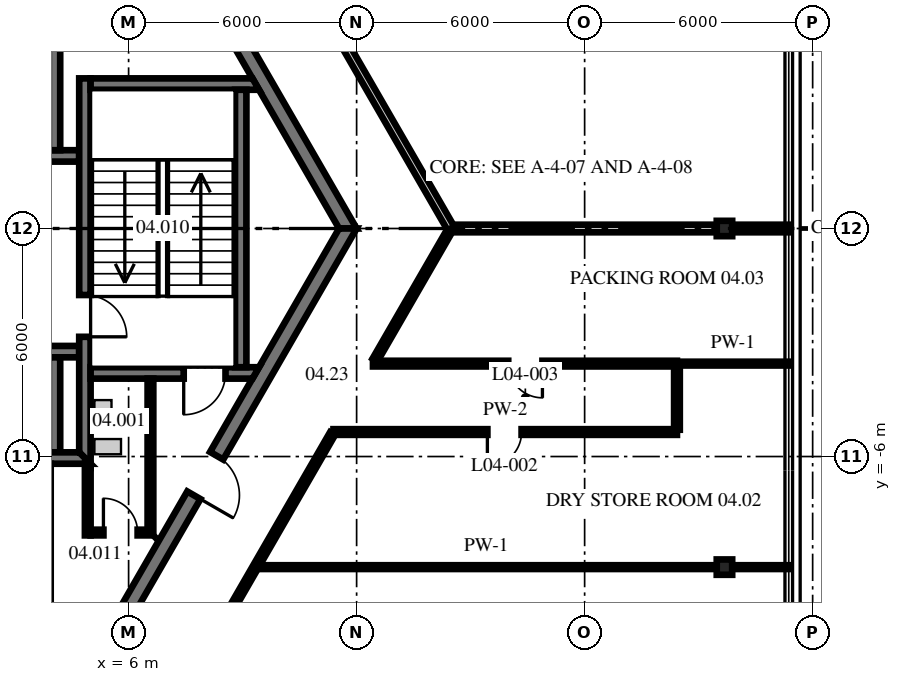
"""IFC4 building model, lengths in metres.
Left out: names, types, materials, properties, quantities, classifications, styles, units other than length and angle.
Written with IfcOpenShell. Run it as: python <this file> out.ifc"""

import sys

from ifc_helpers import new_model, si_unit, direction, frame, frame_2d, origin, origin_2d, place, context, subcontext, project, spatial, polyline, rectangle, i_section, outline, extrude, source, transform, mapped, element, fill, save


model = new_model("IFC4")
c1 = context("Model", 3, precision=1e-05, world=origin(), true_north=direction((0.0, 1.0)))
c2 = subcontext(c1, "Body", "Model", "MODEL_VIEW")
j1 = project(units=[si_unit("LENGTHUNIT", "METRE"), si_unit("PLANEANGLEUNIT", "RADIAN")], contexts=[c1])
p1 = place(None, origin())
s1 = spatial("IfcSite", under=j1, at=p1, CompositionType="ELEMENT")
p2 = place(p1, origin())
s2 = spatial("IfcBuilding", under=s1, at=p2, CompositionType="ELEMENT")
p3 = place(p2, frame((0.0, 0.0, 20.3)))
s3 = spatial("IfcBuildingStorey", under=s2, at=p3, CompositionType="ELEMENT", Elevation=20.3)
m1 = source(origin(), c2, "Body", "SweptSolid", [
    extrude(i_section(OverallWidth=0.404, OverallDepth=0.406, WebThickness=0.027, FlangeThickness=0.044, at=origin_2d()), origin(), (0.0, 0.0, 1.0), 4.3),
])
for number, where, z_axis, x_axis in (
    (1, (21.679, -8.91, 0.0), (0.0, 0.0, 1.0), (0.0, 1.0, 0.0)),
    (2, (21.679, 0.0, 0.0), (0.0, 0.0, 1.0), (0.0, 1.0, 0.0)),
):
    element("IfcColumn", number, at=place(p3, frame(where, z_axis=z_axis, x_axis=x_axis)), inside=s3, PredefinedType="COLUMN", context=c2, shape_type="MappedRepresentation", body=[
        mapped(m1, transform((0.0, 0.0, 0.0), scale=1.0)),
    ])
m2 = source(origin(), c2, "Body", "SweptSolid", [
    extrude(outline(polyline([(-0.115, -0.2), (11.885, -0.2), (11.654, 0.2), (0.115, 0.2), (-0.115, -0.2)])), origin(), (0.0, 0.0, 1.0), 4.1),
])
p4 = place(p3, frame((11.769, 0.0, 0.0), z_axis=(0.0, 0.0, 1.0), x_axis=(-0.499996592174, 0.866027371285, 0.0)))
e3 = element("IfcWall", 3, at=p4, inside=s3, PredefinedType="SHEAR", context=c2, shape_type="MappedRepresentation", body=[
    mapped(m2, transform((0.0, 0.0, 0.0), scale=1.0)),
])
p5 = place(p4, frame((5.75, 0.0, 0.0)))
e4 = element("IfcOpeningElement", 4, at=p5, cuts=e3, PredefinedType="OPENING", context=c2, shape_type="SweptSolid", body=[
    extrude(rectangle(XDim=1.2, YDim=2.1, at=frame_2d((0.6, 1.05))), frame((0.0, 0.21, 0.0), z_axis=(0.0, -1.0, 0.0), x_axis=(1.0, 0.0, 0.0)), (0.0, 0.0, 1.0), 0.42),
])
p6 = place(p3, frame((5.885, -10.192, 0.0), z_axis=(0.0, 0.0, 1.0), x_axis=(0.499996592174, 0.866027371285, 0.0)))
e5 = element("IfcWall", 5, at=p6, inside=s3, PredefinedType="SHEAR", context=c2, shape_type="MappedRepresentation", body=[
    mapped(m2, transform((0.0, 0.0, 0.0), scale=1.0)),
])
p7 = place(p6, frame((3.665, 0.0, 0.0)))
e6 = element("IfcOpeningElement", 6, at=p7, cuts=e5, PredefinedType="OPENING", context=c2, shape_type="SweptSolid", body=[
    extrude(rectangle(XDim=1.2, YDim=2.1, at=frame_2d((0.6, 1.05))), frame((0.0, 0.21, 0.0), z_axis=(0.0, -1.0, 0.0), x_axis=(1.0, 0.0, 0.0)), (0.0, 0.0, 1.0), 0.42),
])
m3 = source(origin(), c2, "Body", "SweptSolid", [
    extrude(rectangle(XDim=3.0, YDim=0.3, at=frame_2d((1.5, 0.0))), origin(), (0.0, 0.0, 1.0), 4.1),
])
p8 = place(p3, frame((1.7, 1.91, 0.0), z_axis=(0.0, 0.0, 1.0), x_axis=(1.0, 0.0, 0.0)))
e7 = element("IfcWall", 7, at=p8, inside=s3, PredefinedType="SHEAR", context=c2, shape_type="MappedRepresentation", body=[
    mapped(m3, transform((0.0, 0.0, 0.0), scale=1.0)),
])
p9 = place(p8, frame((0.55, 0.0, 0.0)))
e8 = element("IfcOpeningElement", 8, at=p9, cuts=e7, PredefinedType="OPENING", context=c2, shape_type="SweptSolid", body=[
    extrude(rectangle(XDim=1.1, YDim=2.1, at=frame_2d((0.55, 1.05))), frame((0.0, 0.16, 0.0), z_axis=(0.0, -1.0, 0.0), x_axis=(1.0, 0.0, 0.0)), (0.0, 0.0, 1.0), 0.32),
])
m4 = source(origin(), c2, "Body", "SweptSolid", [
    extrude(rectangle(XDim=2.9, YDim=0.3, at=frame_2d((1.45, 0.0))), origin(), (0.0, 0.0, 1.0), 4.1),
])
p10 = place(p3, frame((4.05, 2.06, 0.0), z_axis=(0.0, 0.0, 1.0), x_axis=(0.0, 1.0, 0.0)))
e9 = element("IfcWall", 9, at=p10, inside=s3, PredefinedType="SHEAR", context=c2, shape_type="MappedRepresentation", body=[
    mapped(m4, transform((0.0, 0.0, 0.0), scale=1.0)),
])
m5 = source(origin(), c2, "Body", "SweptSolid", [
    extrude(rectangle(XDim=12.8, YDim=0.3, at=frame_2d((6.4, 0.0))), origin(), (0.0, 0.0, 1.0), 4.1),
])
p11 = place(p3, frame((-8.1, -3.24, 0.0), z_axis=(0.0, 0.0, 1.0), x_axis=(1.0, 0.0, 0.0)))
e10 = element("IfcWall", 10, at=p11, inside=s3, PredefinedType="SHEAR", context=c2, shape_type="MappedRepresentation", body=[
    mapped(m5, transform((0.0, 0.0, 0.0), scale=1.0)),
])
p12 = place(p11, frame((2.212, 0.0, 0.0)))
e11 = element("IfcOpeningElement", 11, at=p12, cuts=e10, PredefinedType="OPENING", context=c2, shape_type="SweptSolid", body=[
    extrude(rectangle(XDim=0.9, YDim=2.1, at=frame_2d((0.45, 1.05))), frame((0.0, 0.16, 0.0), z_axis=(0.0, -1.0, 0.0), x_axis=(1.0, 0.0, 0.0)), (0.0, 0.0, 1.0), 0.32),
])
p13 = place(p11, frame((5.65, 0.0, 0.0)))
e12 = element("IfcOpeningElement", 12, at=p13, cuts=e10, PredefinedType="OPENING", context=c2, shape_type="SweptSolid", body=[
    extrude(rectangle(XDim=0.9, YDim=2.1, at=frame_2d((0.45, 1.05))), frame((0.0, 0.16, 0.0), z_axis=(0.0, -1.0, 0.0), x_axis=(1.0, 0.0, 0.0)), (0.0, 0.0, 1.0), 0.32),
])
p14 = place(p11, frame((7.887, 0.0, 0.0)))
e13 = element("IfcOpeningElement", 13, at=p14, cuts=e10, PredefinedType="OPENING", context=c2, shape_type="SweptSolid", body=[
    extrude(rectangle(XDim=0.9, YDim=2.1, at=frame_2d((0.45, 1.05))), frame((0.0, 0.16, 0.0), z_axis=(0.0, -1.0, 0.0), x_axis=(1.0, 0.0, 0.0)), (0.0, 0.0, 1.0), 0.32),
])
p15 = place(p11, frame((10.35, 0.0, 0.0)))
e14 = element("IfcOpeningElement", 14, at=p15, cuts=e10, PredefinedType="OPENING", context=c2, shape_type="SweptSolid", body=[
    extrude(rectangle(XDim=1.1, YDim=2.1, at=frame_2d((0.55, 1.05))), frame((0.0, 0.16, 0.0), z_axis=(0.0, -1.0, 0.0), x_axis=(1.0, 0.0, 0.0)), (0.0, 0.0, 1.0), 0.32),
])
m6 = source(origin(), c2, "Body", "SweptSolid", [
    extrude(rectangle(XDim=2.5, YDim=0.3, at=frame_2d((1.25, 0.0))), origin(), (0.0, 0.0, 1.0), 4.1),
])
p16 = place(p3, frame((4.05, -5.89, 0.0), z_axis=(0.0, 0.0, 1.0), x_axis=(0.0, 1.0, 0.0)))
e15 = element("IfcWall", 15, at=p16, inside=s3, PredefinedType="SHEAR", context=c2, shape_type="MappedRepresentation", body=[
    mapped(m6, transform((0.0, 0.0, 0.0), scale=1.0)),
])
m7 = source(origin(), c2, "Body", "SweptSolid", [
    extrude(outline(polyline([(-0.15, -0.15), (9.99, -0.15), (9.99, 0.15), (0.15, 0.15), (-0.15, -0.15)])), origin(), (0.0, 0.0, 1.0), 4.1),
])
p17 = place(p3, frame((4.85, -6.04, 0.0), z_axis=(0.0, 0.0, 1.0), x_axis=(0.0, 1.0, 0.0)))
e16 = element("IfcWall", 16, at=p17, inside=s3, PredefinedType="SHEAR", context=c2, shape_type="MappedRepresentation", body=[
    mapped(m7, transform((0.0, 0.0, 0.0), scale=1.0)),
])
p18 = place(p17, frame((3.19, 0.0, 0.0)))
e17 = element("IfcOpeningElement", 17, at=p18, cuts=e16, PredefinedType="OPENING", context=c2, shape_type="SweptSolid", body=[
    extrude(rectangle(XDim=1.1, YDim=2.1, at=frame_2d((0.55, 1.05))), frame((0.0, 0.16, 0.0), z_axis=(0.0, -1.0, 0.0), x_axis=(1.0, 0.0, 0.0)), (0.0, 0.0, 1.0), 0.32),
])
m8 = source(origin(), c2, "Body", "SweptSolid", [
    extrude(outline(polyline([(0.0, -0.15), (0.0, 0.15), (4.26, 0.15), (4.433, -0.15), (0.0, -0.15)])), origin(), (0.0, 0.0, 1.0), 4.1),
])
p19 = place(p3, frame((5.0, 3.8, 0.0), z_axis=(0.0, 0.0, 1.0), x_axis=(1.0, 0.0, 0.0)))
e18 = element("IfcWall", 18, at=p19, inside=s3, PredefinedType="SHEAR", context=c2, shape_type="MappedRepresentation", body=[
    mapped(m8, transform((0.0, 0.0, 0.0), scale=1.0)),
])
m9 = source(origin(), c2, "Body", "SweptSolid", [
    extrude(outline(polyline([(0.0, -0.15), (0.0, 0.15), (4.433, 0.15), (4.26, -0.15), (0.0, -0.15)])), origin(), (0.0, 0.0, 1.0), 4.1),
])
p20 = place(p3, frame((5.0, -3.8, 0.0), z_axis=(0.0, 0.0, 1.0), x_axis=(1.0, 0.0, 0.0)))
e19 = element("IfcWall", 19, at=p20, inside=s3, PredefinedType="SHEAR", context=c2, shape_type="MappedRepresentation", body=[
    mapped(m9, transform((0.0, 0.0, 0.0), scale=1.0)),
])
p21 = place(p20, frame((2.45, 0.0, 0.0)))
e20 = element("IfcOpeningElement", 20, at=p21, cuts=e19, PredefinedType="OPENING", context=c2, shape_type="SweptSolid", body=[
    extrude(rectangle(XDim=1.1, YDim=2.1, at=frame_2d((0.55, 1.05))), frame((0.0, 0.16, 0.0), z_axis=(0.0, -1.0, 0.0), x_axis=(1.0, 0.0, 0.0)), (0.0, 0.0, 1.0), 0.32),
])
m10 = source(origin(), c2, "Body", "SweptSolid", [
    extrude(rectangle(XDim=7.3, YDim=0.3, at=frame_2d((3.65, 0.0))), origin(), (0.0, 0.0, 1.0), 4.1),
])
p22 = place(p3, frame((8.95, -3.65, 0.0), z_axis=(0.0, 0.0, 1.0), x_axis=(0.0, 1.0, 0.0)))
e21 = element("IfcWall", 21, at=p22, inside=s3, PredefinedType="SHEAR", context=c2, shape_type="MappedRepresentation", body=[
    mapped(m10, transform((0.0, 0.0, 0.0), scale=1.0)),
])
m11 = source(origin(), c2, "Body", "SweptSolid", [
    extrude(outline(polyline([(0.0, -0.15), (8.95, -0.15), (8.65, 0.15), (0.0, 0.15), (0.0, -0.15)])), origin(), (0.0, 0.0, 1.0), 4.1),
])
p23 = place(p3, frame((-3.95, -6.04, 0.0), z_axis=(0.0, 0.0, 1.0), x_axis=(1.0, 0.0, 0.0)))
e22 = element("IfcWall", 22, at=p23, inside=s3, PredefinedType="SHEAR", context=c2, shape_type="MappedRepresentation", body=[
    mapped(m11, transform((0.0, 0.0, 0.0), scale=1.0)),
])
m12 = source(origin(), c2, "Body", "SweptSolid", [
    extrude(outline(polyline([(0.0, -0.075), (1.65, -0.075), (1.5, 0.075), (0.0, 0.075), (0.0, -0.075)])), origin(), (0.0, 0.0, 1.0), 4.1),
])
p24 = place(p3, frame((5.0, -8.0, 0.0), z_axis=(0.0, 0.0, 1.0), x_axis=(1.0, 0.0, 0.0)))
e23 = element("IfcWall", 23, at=p24, inside=s3, PredefinedType="PARTITIONING", context=c2, shape_type="MappedRepresentation", body=[
    mapped(m12, transform((0.0, 0.0, 0.0), scale=1.0)),
])
p25 = place(p24, frame((0.337, 0.0, 0.0)))
e24 = element("IfcOpeningElement", 24, at=p25, cuts=e23, PredefinedType="OPENING", context=c2, shape_type="SweptSolid", body=[
    extrude(rectangle(XDim=0.9, YDim=2.1, at=frame_2d((0.45, 1.05))), frame((0.0, 0.085, 0.0), z_axis=(0.0, -1.0, 0.0), x_axis=(1.0, 0.0, 0.0)), (0.0, 0.0, 1.0), 0.17),
])
m13 = source(origin(), c2, "Body", "SweptSolid", [
    extrude(outline(polyline([(-0.075, -0.075), (4.05, -0.075), (4.05, 0.075), (0.075, 0.075), (-0.075, -0.075)])), origin(), (0.0, 0.0, 1.0), 4.1),
])
p26 = place(p3, frame((6.575, -8.0, 0.0), z_axis=(0.0, 0.0, 1.0), x_axis=(0.0, 1.0, 0.0)))
e25 = element("IfcWall", 25, at=p26, inside=s3, PredefinedType="PARTITIONING", context=c2, shape_type="MappedRepresentation", body=[
    mapped(m13, transform((0.0, 0.0, 0.0), scale=1.0)),
])
m14 = source(origin(), c2, "Body", "SweptSolid", [
    extrude(rectangle(XDim=1.885, YDim=0.15, at=frame_2d((0.942, 0.0))), origin(), (0.0, 0.0, 1.0), 4.1),
])
p27 = place(p3, frame((4.925, -8.075, 0.0), z_axis=(0.0, 0.0, 1.0), x_axis=(0.0, 1.0, 0.0)))
e26 = element("IfcWall", 26, at=p27, inside=s3, PredefinedType="PARTITIONING", context=c2, shape_type="MappedRepresentation", body=[
    mapped(m14, transform((0.0, 0.0, 0.0), scale=1.0)),
])
m15 = source(origin(), c2, "Body", "SweptSolid", [
    extrude(rectangle(XDim=8.229, YDim=0.2, at=frame_2d((4.115, 0.0))), origin(), (0.0, 0.0, 1.0), 4.1),
])
p28 = place(p3, frame((10.368, 7.127, 0.0), z_axis=(0.0, 0.0, 1.0), x_axis=(0.500012644715, -0.866018103232, 0.0)))
e27 = element("IfcWall", 27, at=p28, inside=s3, PredefinedType="PARTITIONING", context=c2, shape_type="MappedRepresentation", body=[
    mapped(m15, transform((0.0, 0.0, 0.0), scale=1.0)),
])
m16 = source(origin(), c2, "Body", "SweptSolid", [
    extrude(rectangle(XDim=12.148, YDim=0.1, at=frame_2d((6.074, 0.0))), origin(), (0.0, 0.0, 1.0), 3.343),
])
p29 = place(p3, frame((9.338, -8.91, 0.0), z_axis=(0.0, 0.0, 1.0), x_axis=(1.0, 0.0, 0.0)))
e28 = element("IfcWall", 28, at=p29, inside=s3, PredefinedType="PARTITIONING", context=c2, shape_type="MappedRepresentation", body=[
    mapped(m16, transform((0.0, 0.0, 0.0), scale=1.0)),
])
m17 = source(origin(), c2, "Body", "SweptSolid", [
    extrude(rectangle(XDim=1.499, YDim=0.1, at=frame_2d((0.749, 0.0))), origin(), (0.0, 0.0, 1.0), 4.1),
])
p30 = place(p3, frame((21.873, -8.91, 0.0), z_axis=(0.0, 0.0, 1.0), x_axis=(1.0, 0.0, 0.0)))
e29 = element("IfcWall", 29, at=p30, inside=s3, PredefinedType="PARTITIONING", context=c2, shape_type="MappedRepresentation", body=[
    mapped(m17, transform((0.0, 0.0, 0.0), scale=1.0)),
])
m18 = source(origin(), c2, "Body", "SweptSolid", [
    extrude(rectangle(XDim=9.039, YDim=0.15, at=frame_2d((4.519, 0.0))), origin(), (0.0, 0.0, 1.0), 4.1),
])
p31 = place(p3, frame((11.391, -5.355, 0.0), z_axis=(0.0, 0.0, 1.0), x_axis=(1.0, 0.0, 0.0)))
e30 = element("IfcWall", 30, at=p31, inside=s3, PredefinedType="PARTITIONING", context=c2, shape_type="MappedRepresentation", body=[
    mapped(m18, transform((0.0, 0.0, 0.0), scale=1.0)),
])
p32 = place(p31, frame((4.05, 0.0, 0.0)))
e31 = element("IfcOpeningElement", 31, at=p32, cuts=e30, PredefinedType="OPENING", context=c2, shape_type="SweptSolid", body=[
    extrude(rectangle(XDim=0.9, YDim=2.1, at=frame_2d((0.45, 1.05))), frame((0.0, 0.085, 0.0), z_axis=(0.0, -1.0, 0.0), x_axis=(1.0, 0.0, 0.0)), (0.0, 0.0, 1.0), 0.17),
])
m19 = source(origin(), c2, "Body", "SweptSolid", [
    extrude(rectangle(XDim=7.999, YDim=0.15, at=frame_2d((4.0, 0.0))), origin(), (0.0, 0.0, 1.0), 4.1),
])
p33 = place(p3, frame((12.43, -3.555, 0.0), z_axis=(0.0, 0.0, 1.0), x_axis=(1.0, 0.0, 0.0)))
e32 = element("IfcWall", 32, at=p33, inside=s3, PredefinedType="PARTITIONING", context=c2, shape_type="MappedRepresentation", body=[
    mapped(m19, transform((0.0, 0.0, 0.0), scale=1.0)),
])
p34 = place(p33, frame((3.559, 0.0, 0.0)))
e33 = element("IfcOpeningElement", 33, at=p34, cuts=e32, PredefinedType="OPENING", context=c2, shape_type="SweptSolid", body=[
    extrude(rectangle(XDim=0.9, YDim=2.1, at=frame_2d((0.45, 1.05))), frame((0.0, 0.085, 0.0), z_axis=(0.0, -1.0, 0.0), x_axis=(1.0, 0.0, 0.0)), (0.0, 0.0, 1.0), 0.17),
])
m20 = source(origin(), c2, "Body", "SweptSolid", [
    extrude(rectangle(XDim=2.942, YDim=0.1, at=frame_2d((1.471, 0.0))), origin(), (0.0, 0.0, 1.0), 4.1),
])
p35 = place(p3, frame((20.429, -3.555, 0.0), z_axis=(0.0, 0.0, 1.0), x_axis=(1.0, 0.0, 0.0)))
e34 = element("IfcWall", 34, at=p35, inside=s3, PredefinedType="PARTITIONING", context=c2, shape_type="MappedRepresentation", body=[
    mapped(m20, transform((0.0, 0.0, 0.0), scale=1.0)),
])
m21 = source(origin(), c2, "Body", "SweptSolid", [
    extrude(rectangle(XDim=6.934, YDim=0.2, at=frame_2d((3.467, 0.0))), origin(), (0.0, 0.0, 1.0), 3.488),
])
p36 = place(p3, frame((14.552, 0.0, 0.0), z_axis=(0.0, 0.0, 1.0), x_axis=(1.0, 0.0, 0.0)))
e35 = element("IfcWall", 35, at=p36, inside=s3, PredefinedType="PARTITIONING", context=c2, shape_type="MappedRepresentation", body=[
    mapped(m21, transform((0.0, 0.0, 0.0), scale=1.0)),
])
m22 = source(origin(), c2, "Body", "SweptSolid", [
    extrude(rectangle(XDim=1.499, YDim=0.2, at=frame_2d((0.749, 0.0))), origin(), (0.0, 0.0, 1.0), 4.1),
])
p37 = place(p3, frame((21.873, 0.0, 0.0), z_axis=(0.0, 0.0, 1.0), x_axis=(1.0, 0.0, 0.0)))
e36 = element("IfcWall", 36, at=p37, inside=s3, PredefinedType="PARTITIONING", context=c2, shape_type="MappedRepresentation", body=[
    mapped(m22, transform((0.0, 0.0, 0.0), scale=1.0)),
])
m23 = source(origin(), c2, "Body", "SweptSolid", [
    extrude(rectangle(XDim=8.219, YDim=0.15, at=frame_2d((4.11, 0.0))), origin(), (0.0, 0.0, 1.0), 4.1),
])
p38 = place(p3, frame((7.256, -12.516, 0.0), z_axis=(0.0, 0.0, 1.0), x_axis=(0.499994999852, 0.866028290602, 0.0)))
e37 = element("IfcWall", 37, at=p38, inside=s3, PredefinedType="PARTITIONING", context=c2, shape_type="MappedRepresentation", body=[
    mapped(m23, transform((0.0, 0.0, 0.0), scale=1.0)),
])
p39 = place(p38, frame((1.62, 0.0, 0.0)))
e38 = element("IfcOpeningElement", 38, at=p39, cuts=e37, PredefinedType="OPENING", context=c2, shape_type="SweptSolid", body=[
    extrude(rectangle(XDim=0.9, YDim=2.1, at=frame_2d((0.45, 1.05))), frame((0.0, 0.085, 0.0), z_axis=(0.0, -1.0, 0.0), x_axis=(1.0, 0.0, 0.0)), (0.0, 0.0, 1.0), 0.17),
])
m24 = source(origin(), c2, "Body", "SweptSolid", [
    extrude(rectangle(XDim=3.925, YDim=0.15, at=frame_2d((1.962, 0.0))), origin(), (0.0, 0.0, 1.0), 4.1),
])
p40 = place(p3, frame((12.485, -3.46, 0.0), z_axis=(0.0, 0.0, 1.0), x_axis=(0.499979109433, 0.866037464623, 0.0)))
e39 = element("IfcWall", 39, at=p40, inside=s3, PredefinedType="PARTITIONING", context=c2, shape_type="MappedRepresentation", body=[
    mapped(m24, transform((0.0, 0.0, 0.0), scale=1.0)),
])
m25 = source(origin(), c2, "Body", "SweptSolid", [
    extrude(rectangle(XDim=1.68, YDim=0.15, at=frame_2d((0.84, 0.0))), origin(), (0.0, 0.0, 1.0), 4.1),
])
p41 = place(p3, frame((20.429, -5.295, 0.0), z_axis=(0.0, 0.0, 1.0), x_axis=(0.0, 1.0, 0.0)))
e40 = element("IfcWall", 40, at=p41, inside=s3, PredefinedType="PARTITIONING", context=c2, shape_type="MappedRepresentation", body=[
    mapped(m25, transform((0.0, 0.0, 0.0), scale=1.0)),
])
p42 = place(p7, frame((1.2, 0.0, 0.0), z_axis=(0.0, 0.0, 1.0), x_axis=(-1.0, 0.0, 0.0)))
e41 = element("IfcDoor", 41, at=p42, inside=s3, OperationType="SINGLE_SWING_RIGHT", PredefinedType="DOOR", context=c2, shape_type="SweptSolid", body=[
    extrude(rectangle(XDim=1.2, YDim=2.1, at=frame_2d((0.6, 1.05))), frame((0.0, 0.025, 0.0), z_axis=(0.0, -1.0, 0.0), x_axis=(1.0, 0.0, 0.0)), (0.0, 0.0, 1.0), 0.05),
])
fill(e6, e41)
p43 = place(p18, frame((1.1, 0.0, 0.0), z_axis=(0.0, 0.0, 1.0), x_axis=(-1.0, 0.0, 0.0)))
e42 = element("IfcDoor", 42, at=p43, inside=s3, OperationType="SINGLE_SWING_RIGHT", PredefinedType="DOOR", context=c2, shape_type="SweptSolid", body=[
    extrude(rectangle(XDim=1.1, YDim=2.1, at=frame_2d((0.55, 1.05))), frame((0.0, 0.025, 0.0), z_axis=(0.0, -1.0, 0.0), x_axis=(1.0, 0.0, 0.0)), (0.0, 0.0, 1.0), 0.05),
])
fill(e17, e42)
p44 = place(p21, frame((1.1, 0.0, 0.0), z_axis=(0.0, 0.0, 1.0), x_axis=(-1.0, 0.0, 0.0)))
e43 = element("IfcDoor", 43, at=p44, inside=s3, OperationType="SINGLE_SWING_RIGHT", PredefinedType="DOOR", context=c2, shape_type="SweptSolid", body=[
    extrude(rectangle(XDim=1.1, YDim=2.1, at=frame_2d((0.55, 1.05))), frame((0.0, 0.025, 0.0), z_axis=(0.0, -1.0, 0.0), x_axis=(1.0, 0.0, 0.0)), (0.0, 0.0, 1.0), 0.05),
])
fill(e20, e43)
p45 = place(p25, origin())
e44 = element("IfcDoor", 44, at=p45, inside=s3, OperationType="SINGLE_SWING_LEFT", PredefinedType="DOOR", context=c2, shape_type="SweptSolid", body=[
    extrude(rectangle(XDim=0.9, YDim=2.1, at=frame_2d((0.45, 1.05))), frame((0.0, 0.025, 0.0), z_axis=(0.0, -1.0, 0.0), x_axis=(1.0, 0.0, 0.0)), (0.0, 0.0, 1.0), 0.05),
])
fill(e24, e44)
p46 = place(p32, origin())
e45 = element("IfcDoor", 45, at=p46, inside=s3, OperationType="SINGLE_SWING_RIGHT", PredefinedType="DOOR", context=c2, shape_type="SweptSolid", body=[
    extrude(rectangle(XDim=0.9, YDim=2.1, at=frame_2d((0.45, 1.05))), frame((0.0, 0.025, 0.0), z_axis=(0.0, -1.0, 0.0), x_axis=(1.0, 0.0, 0.0)), (0.0, 0.0, 1.0), 0.05),
])
fill(e31, e45)
p47 = place(p34, origin())
e46 = element("IfcDoor", 46, at=p47, inside=s3, OperationType="SINGLE_SWING_RIGHT", PredefinedType="DOOR", context=c2, shape_type="SweptSolid", body=[
    extrude(rectangle(XDim=0.9, YDim=2.1, at=frame_2d((0.45, 1.05))), frame((0.0, 0.025, 0.0), z_axis=(0.0, -1.0, 0.0), x_axis=(1.0, 0.0, 0.0)), (0.0, 0.0, 1.0), 0.05),
])
fill(e33, e46)
save(model, sys.argv[1])
